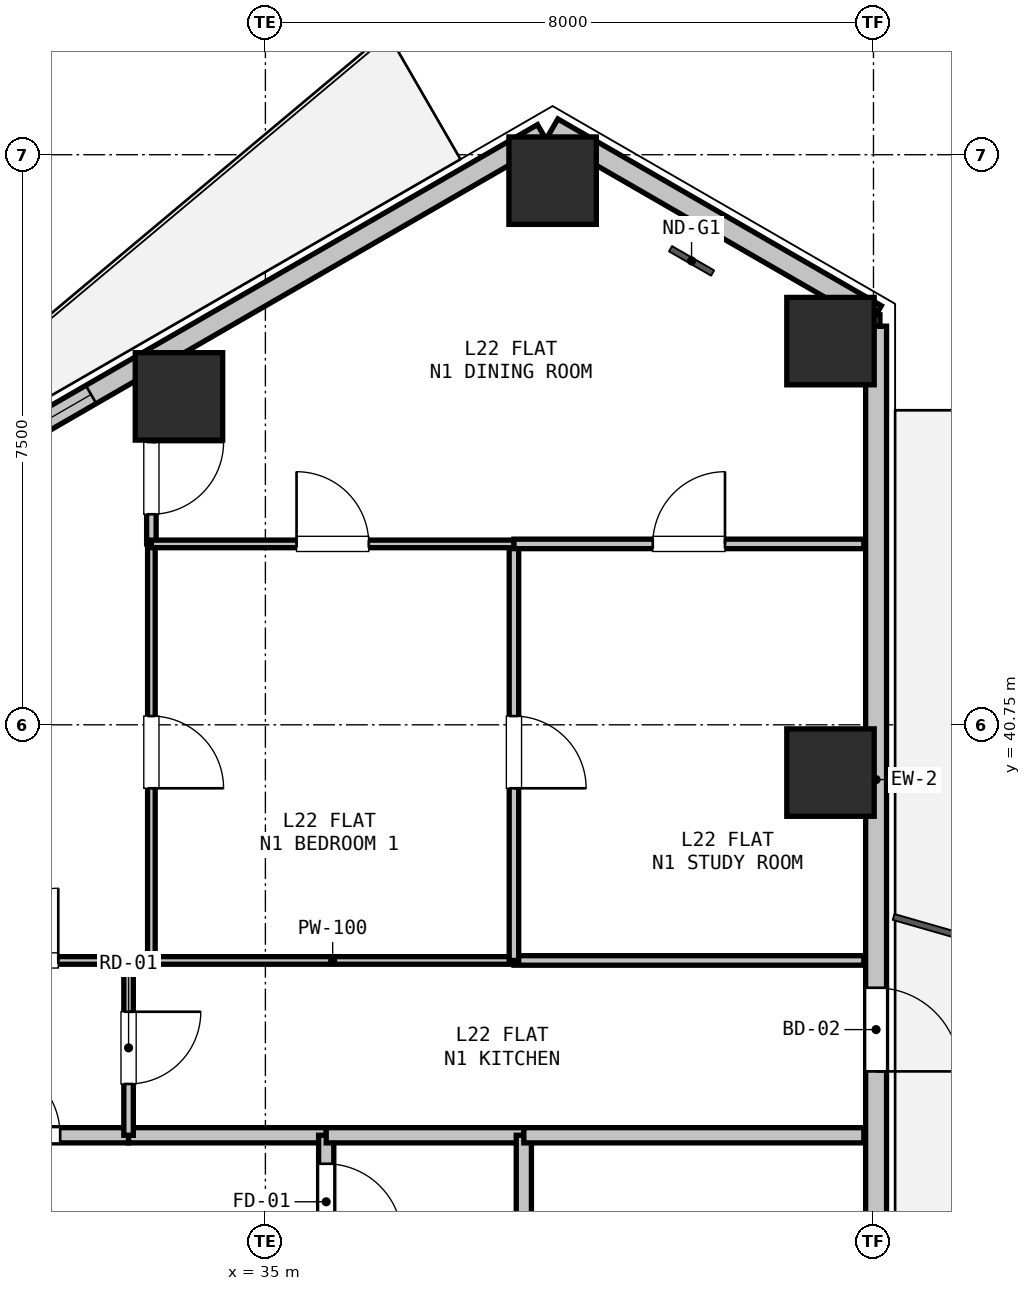
"""IFC4 building model, lengths in metres.
Left out: names, types, materials, properties, quantities, classifications, styles, units other than length and angle.
Written with IfcOpenShell. Run it as: python <this file> out.ifc"""

import sys

from ifc_helpers import new_model, si_unit, direction, frame, frame_2d, origin, origin_2d, place, context, subcontext, project, spatial, rectangle, hollow_rectangle, extrude, element, fill, save


model = new_model("IFC4")
c1 = context("Model", 3, precision=1e-05, world=origin(), true_north=direction((0.0, 1.0)))
c2 = subcontext(c1, "Body", "Model", "MODEL_VIEW")
j1 = project(units=[si_unit("LENGTHUNIT", "METRE"), si_unit("PLANEANGLEUNIT", "RADIAN")], contexts=[c1])
p1 = place(None, origin())
s1 = spatial("IfcSite", under=j1, at=p1, CompositionType="ELEMENT")
p2 = place(p1, origin())
s2 = spatial("IfcBuilding", under=s1, at=p2, CompositionType="ELEMENT")
p3 = place(p2, frame((0.0, 0.0, 83.4)))
s3 = spatial("IfcBuildingStorey", under=s2, at=p3, CompositionType="ELEMENT", Elevation=83.4)
for number, where, z_axis, x_axis in (
    (1, (33.863, 45.071, 0.0), (0.0, 0.0, 1.0), (1.0, 0.0, 0.0)),
    (2, (38.779, 47.909, 0.0), (0.0, 0.0, 1.0), (1.0, 0.0, 0.0)),
    (3, (42.435, 45.798, 0.0), (0.0, 0.0, 1.0), (1.0, 0.0, 0.0)),
    (4, (42.435, 40.122, 0.0), (0.0, 0.0, 1.0), (1.0, 0.0, 0.0)),
):
    element("IfcColumn", number, at=place(p3, frame(where, z_axis=z_axis, x_axis=x_axis)), inside=s3, PredefinedType="COLUMN", context=c2, shape_type="SweptSolid", body=[
        extrude(hollow_rectangle(XDim=1.15, YDim=1.15, WallThickness=0.032, at=origin_2d()), origin(), (0.0, 0.0, 1.0), 3.3),
    ])
p4 = place(p3, frame((38.779, 48.602, 0.0), z_axis=(0.0, 0.0, 1.0), x_axis=(0.866011848704, -0.500023477353, 0.0)))
e5 = element("IfcWall", 5, at=p4, inside=s3, PredefinedType="SOLIDWALL", context=c2, shape_type="SweptSolid", body=[
    extrude(rectangle(XDim=4.914, YDim=0.275, at=frame_2d((2.457, 0.0))), origin(), (0.0, 0.0, 1.0), 2.67),
])
p5 = place(p3, frame((28.317, 42.562, 0.0), z_axis=(0.0, 0.0, 1.0), x_axis=(0.866023023012, 0.500004123596, 0.0)))
e6 = element("IfcWall", 6, at=p5, inside=s3, PredefinedType="SOLIDWALL", context=c2, shape_type="SweptSolid", body=[
    extrude(rectangle(XDim=11.93, YDim=0.275, at=frame_2d((5.965, 0.0))), origin(), (0.0, 0.0, 1.0), 2.67),
])
p6 = place(p5, frame((2.668, 0.0, 0.9)))
e7 = element("IfcOpeningElement", 7, at=p6, cuts=e6, PredefinedType="OPENING", context=c2, shape_type="SweptSolid", body=[
    extrude(rectangle(XDim=2.4, YDim=1.6, at=frame_2d((1.2, 0.8))), frame((0.0, 0.147, 0.0), z_axis=(0.0, -1.0, 0.0), x_axis=(1.0, 0.0, 0.0)), (0.0, 0.0, 1.0), 0.295),
])
p7 = place(p3, frame((43.035, 45.994, 0.0), z_axis=(0.0, 0.0, 1.0), x_axis=(0.0, -1.0, 0.0)))
e8 = element("IfcWall", 8, at=p7, inside=s3, PredefinedType="SOLIDWALL", context=c2, shape_type="SweptSolid", body=[
    extrude(rectangle(XDim=11.93, YDim=0.275, at=frame_2d((5.965, 0.0))), origin(), (0.0, 0.0, 1.0), 2.67),
])
p8 = place(p7, frame((8.704, 0.0, 0.0)))
e9 = element("IfcOpeningElement", 9, at=p8, cuts=e8, PredefinedType="OPENING", context=c2, shape_type="SweptSolid", body=[
    extrude(rectangle(XDim=1.1, YDim=2.1, at=frame_2d((0.55, 1.05))), frame((0.0, 0.147, 0.0), z_axis=(0.0, -1.0, 0.0), x_axis=(1.0, 0.0, 0.0)), (0.0, 0.0, 1.0), 0.295),
])
p9 = place(p3, frame((30.4, 35.35, 0.0), z_axis=(0.0, 0.0, 1.0), x_axis=(1.0, 0.0, 0.0)))
e10 = element("IfcWall", 10, at=p9, inside=s3, PredefinedType="PARTITIONING", context=c2, shape_type="SweptSolid", body=[
    extrude(rectangle(XDim=2.8, YDim=0.2, at=frame_2d((1.4, 0.0))), origin(), (0.0, 0.0, 1.0), 3.05),
])
p10 = place(p9, frame((0.9, 0.0, 0.0)))
e11 = element("IfcOpeningElement", 11, at=p10, cuts=e10, PredefinedType="OPENING", context=c2, shape_type="SweptSolid", body=[
    extrude(rectangle(XDim=1.0, YDim=2.15, at=frame_2d((0.5, 1.075))), frame((0.0, 0.11, 0.0), z_axis=(0.0, -1.0, 0.0), x_axis=(1.0, 0.0, 0.0)), (0.0, 0.0, 1.0), 0.22),
])
p11 = place(p3, frame((33.2, 35.35, 0.0), z_axis=(0.0, 0.0, 1.0), x_axis=(1.0, 0.0, 0.0)))
e12 = element("IfcWall", 12, at=p11, inside=s3, PredefinedType="PARTITIONING", context=c2, shape_type="SweptSolid", body=[
    extrude(rectangle(XDim=2.6, YDim=0.2, at=frame_2d((1.3, 0.0))), origin(), (0.0, 0.0, 1.0), 3.05),
])
p12 = place(p3, frame((35.8, 35.35, 0.0), z_axis=(0.0, 0.0, 1.0), x_axis=(0.0, -1.0, 0.0)))
e13 = element("IfcWall", 13, at=p12, inside=s3, PredefinedType="PARTITIONING", context=c2, shape_type="SweptSolid", body=[
    extrude(rectangle(XDim=1.75, YDim=0.2, at=frame_2d((0.875, 0.0))), origin(), (0.0, 0.0, 1.0), 3.05),
])
p13 = place(p12, frame((0.375, 0.0, 0.0)))
e14 = element("IfcOpeningElement", 14, at=p13, cuts=e13, PredefinedType="OPENING", context=c2, shape_type="SweptSolid", body=[
    extrude(rectangle(XDim=1.0, YDim=2.15, at=frame_2d((0.5, 1.075))), frame((0.0, 0.11, 0.0), z_axis=(0.0, -1.0, 0.0), x_axis=(1.0, 0.0, 0.0)), (0.0, 0.0, 1.0), 0.22),
])
p14 = place(p3, frame((35.8, 35.35, 0.0), z_axis=(0.0, 0.0, 1.0), x_axis=(1.0, 0.0, 0.0)))
e15 = element("IfcWall", 15, at=p14, inside=s3, PredefinedType="PARTITIONING", context=c2, shape_type="SweptSolid", body=[
    extrude(rectangle(XDim=2.6, YDim=0.2, at=frame_2d((1.3, 0.0))), origin(), (0.0, 0.0, 1.0), 2.423),
])
p15 = place(p3, frame((38.4, 35.35, 0.0), z_axis=(0.0, 0.0, 1.0), x_axis=(0.0, -1.0, 0.0)))
e16 = element("IfcWall", 16, at=p15, inside=s3, PredefinedType="PARTITIONING", context=c2, shape_type="SweptSolid", body=[
    extrude(rectangle(XDim=6.85, YDim=0.2, at=frame_2d((3.425, 0.0))), origin(), (0.0, 0.0, 1.0), 3.05),
])
p16 = place(p15, frame((2.925, 0.0, 0.0)))
e17 = element("IfcOpeningElement", 17, at=p16, cuts=e16, PredefinedType="OPENING", context=c2, shape_type="SweptSolid", body=[
    extrude(rectangle(XDim=1.0, YDim=2.15, at=frame_2d((0.5, 1.075))), frame((0.0, 0.11, 0.0), z_axis=(0.0, -1.0, 0.0), x_axis=(1.0, 0.0, 0.0)), (0.0, 0.0, 1.0), 0.22),
])
p17 = place(p3, frame((30.4, 37.65, 0.0), z_axis=(0.0, 0.0, 1.0), x_axis=(1.0, 0.0, 0.0)))
e18 = element("IfcWall", 18, at=p17, inside=s3, PredefinedType="PARTITIONING", context=c2, shape_type="SweptSolid", body=[
    extrude(rectangle(XDim=2.8, YDim=0.1, at=frame_2d((1.4, 0.0))), origin(), (0.0, 0.0, 1.0), 3.05),
])
p18 = place(p17, frame((0.925, 0.0, 0.0)))
e19 = element("IfcOpeningElement", 19, at=p18, cuts=e18, PredefinedType="OPENING", context=c2, shape_type="SweptSolid", body=[
    extrude(rectangle(XDim=0.95, YDim=2.1, at=frame_2d((0.475, 1.05))), frame((0.0, 0.06, 0.0), z_axis=(0.0, -1.0, 0.0), x_axis=(1.0, 0.0, 0.0)), (0.0, 0.0, 1.0), 0.12),
])
p19 = place(p3, frame((33.2, 37.65, 0.0), z_axis=(0.0, 0.0, 1.0), x_axis=(0.0, -1.0, 0.0)))
e20 = element("IfcWall", 20, at=p19, inside=s3, PredefinedType="PARTITIONING", context=c2, shape_type="SweptSolid", body=[
    extrude(rectangle(XDim=2.3, YDim=0.125, at=frame_2d((1.15, 0.0))), origin(), (0.0, 0.0, 1.0), 3.05),
])
p20 = place(p19, frame((0.675, 0.0, 0.0)))
e21 = element("IfcOpeningElement", 21, at=p20, cuts=e20, PredefinedType="OPENING", context=c2, shape_type="SweptSolid", body=[
    extrude(rectangle(XDim=0.95, YDim=2.1, at=frame_2d((0.475, 1.05))), frame((0.0, 0.073, 0.0), z_axis=(0.0, -1.0, 0.0), x_axis=(1.0, 0.0, 0.0)), (0.0, 0.0, 1.0), 0.145),
])
p21 = place(p3, frame((42.873, 35.35, 0.0), z_axis=(0.0, 0.0, 1.0), x_axis=(-1.0, 0.0, 0.0)))
e22 = element("IfcWall", 22, at=p21, inside=s3, PredefinedType="PARTITIONING", context=c2, shape_type="SweptSolid", body=[
    extrude(rectangle(XDim=4.473, YDim=0.2, at=frame_2d((2.237, 0.0))), origin(), (0.0, 0.0, 1.0), 2.365),
])
p22 = place(p3, frame((33.2, 37.65, 0.0), z_axis=(0.0, 0.0, 1.0), x_axis=(1.0, 0.0, 0.0)))
e23 = element("IfcWall", 23, at=p22, inside=s3, PredefinedType="PARTITIONING", context=c2, shape_type="SweptSolid", body=[
    extrude(rectangle(XDim=0.3, YDim=0.125, at=frame_2d((0.15, 0.0))), origin(), (0.0, 0.0, 1.0), 3.05),
])
p23 = place(p3, frame((33.5, 37.65, 0.0), z_axis=(0.0, 0.0, 1.0), x_axis=(1.0, 0.0, 0.0)))
e24 = element("IfcWall", 24, at=p23, inside=s3, PredefinedType="PARTITIONING", context=c2, shape_type="SweptSolid", body=[
    extrude(rectangle(XDim=4.77, YDim=0.1, at=frame_2d((2.385, 0.0))), origin(), (0.0, 0.0, 1.0), 2.423),
])
p24 = place(p3, frame((38.27, 37.65, 0.0), z_axis=(0.0, 0.0, 1.0), x_axis=(1.0, 0.0, 0.0)))
e25 = element("IfcWall", 25, at=p24, inside=s3, PredefinedType="PARTITIONING", context=c2, shape_type="SweptSolid", body=[
    extrude(rectangle(XDim=4.603, YDim=0.125, at=frame_2d((2.302, 0.0))), origin(), (0.0, 0.0, 1.0), 2.365),
])
p25 = place(p3, frame((33.5, 45.367, 0.0), z_axis=(0.0, 0.0, 1.0), x_axis=(0.0, -1.0, 0.0)))
e26 = element("IfcWall", 26, at=p25, inside=s3, PredefinedType="PARTITIONING", context=c2, shape_type="SweptSolid", body=[
    extrude(rectangle(XDim=2.237, YDim=0.125, at=frame_2d((1.119, 0.0))), origin(), (0.0, 0.0, 1.0), 2.66),
])
p26 = place(p25, frame((0.897, 0.0, 0.0)))
e27 = element("IfcOpeningElement", 27, at=p26, cuts=e26, PredefinedType="OPENING", context=c2, shape_type="SweptSolid", body=[
    extrude(rectangle(XDim=0.95, YDim=2.1, at=frame_2d((0.475, 1.05))), frame((0.0, 0.073, 0.0), z_axis=(0.0, -1.0, 0.0), x_axis=(1.0, 0.0, 0.0)), (0.0, 0.0, 1.0), 0.145),
])
p27 = place(p3, frame((33.5, 43.13, 0.0), z_axis=(0.0, 0.0, 1.0), x_axis=(0.0, -1.0, 0.0)))
e28 = element("IfcWall", 28, at=p27, inside=s3, PredefinedType="PARTITIONING", context=c2, shape_type="SweptSolid", body=[
    extrude(rectangle(XDim=5.48, YDim=0.1, at=frame_2d((2.74, 0.0))), origin(), (0.0, 0.0, 1.0), 3.05),
])
p28 = place(p27, frame((2.265, 0.0, 0.0)))
e29 = element("IfcOpeningElement", 29, at=p28, cuts=e28, PredefinedType="OPENING", context=c2, shape_type="SweptSolid", body=[
    extrude(rectangle(XDim=0.95, YDim=2.1, at=frame_2d((0.475, 1.05))), frame((0.0, 0.06, 0.0), z_axis=(0.0, -1.0, 0.0), x_axis=(1.0, 0.0, 0.0)), (0.0, 0.0, 1.0), 0.12),
])
p29 = place(p3, frame((38.27, 43.13, 0.0), z_axis=(0.0, 0.0, 1.0), x_axis=(0.0, -1.0, 0.0)))
e30 = element("IfcWall", 30, at=p29, inside=s3, PredefinedType="PARTITIONING", context=c2, shape_type="SweptSolid", body=[
    extrude(rectangle(XDim=5.48, YDim=0.125, at=frame_2d((2.74, 0.0))), origin(), (0.0, 0.0, 1.0), 3.05),
])
p30 = place(p29, frame((2.265, 0.0, 0.0)))
e31 = element("IfcOpeningElement", 31, at=p30, cuts=e30, PredefinedType="OPENING", context=c2, shape_type="SweptSolid", body=[
    extrude(rectangle(XDim=0.95, YDim=2.1, at=frame_2d((0.475, 1.05))), frame((0.0, 0.073, 0.0), z_axis=(0.0, -1.0, 0.0), x_axis=(1.0, 0.0, 0.0)), (0.0, 0.0, 1.0), 0.145),
])
p31 = place(p3, frame((33.5, 43.13, 0.0), z_axis=(0.0, 0.0, 1.0), x_axis=(1.0, 0.0, 0.0)))
e32 = element("IfcWall", 32, at=p31, inside=s3, PredefinedType="PARTITIONING", context=c2, shape_type="SweptSolid", body=[
    extrude(rectangle(XDim=4.77, YDim=0.1, at=frame_2d((2.385, 0.0))), origin(), (0.0, 0.0, 1.0), 2.423),
])
p32 = place(p31, frame((1.91, 0.0, 0.0)))
e33 = element("IfcOpeningElement", 33, at=p32, cuts=e32, PredefinedType="OPENING", context=c2, shape_type="SweptSolid", body=[
    extrude(rectangle(XDim=0.95, YDim=2.1, at=frame_2d((0.475, 1.05))), frame((0.0, 0.06, 0.0), z_axis=(0.0, -1.0, 0.0), x_axis=(1.0, 0.0, 0.0)), (0.0, 0.0, 1.0), 0.12),
])
p33 = place(p3, frame((38.27, 43.13, 0.0), z_axis=(0.0, 0.0, 1.0), x_axis=(1.0, 0.0, 0.0)))
e34 = element("IfcWall", 34, at=p33, inside=s3, PredefinedType="PARTITIONING", context=c2, shape_type="SweptSolid", body=[
    extrude(rectangle(XDim=4.603, YDim=0.125, at=frame_2d((2.302, 0.0))), origin(), (0.0, 0.0, 1.0), 2.66),
])
p34 = place(p33, frame((1.826, 0.0, 0.0)))
e35 = element("IfcOpeningElement", 35, at=p34, cuts=e34, PredefinedType="OPENING", context=c2, shape_type="SweptSolid", body=[
    extrude(rectangle(XDim=0.95, YDim=2.1, at=frame_2d((0.475, 1.05))), frame((0.0, 0.073, 0.0), z_axis=(0.0, -1.0, 0.0), x_axis=(1.0, 0.0, 0.0)), (0.0, 0.0, 1.0), 0.145),
])
p35 = place(p3, frame((43.035, 46.144, 0.0), z_axis=(0.0, 0.0, 1.0), x_axis=(0.0, -1.0, 0.0)))
e36 = element("IfcWall", 36, at=p35, inside=s3, PredefinedType="PARTITIONING", context=c2, shape_type="SweptSolid", body=[
    extrude(rectangle(XDim=0.15, YDim=0.1, at=frame_2d((0.075, 0.0))), origin(), (0.0, 0.0, 1.0), 3.05),
])
p36 = place(p6, origin())
e37 = element("IfcWindow", 37, at=p36, inside=s3, PartitioningType="SINGLE_PANEL", PredefinedType="WINDOW", context=c2, shape_type="SweptSolid", body=[
    extrude(rectangle(XDim=2.4, YDim=1.6, at=frame_2d((1.2, 0.8))), frame((0.0, 0.03, 0.0), z_axis=(0.0, -1.0, 0.0), x_axis=(1.0, 0.0, 0.0)), (0.0, 0.0, 1.0), 0.06),
])
fill(e7, e37)
p37 = place(p8, origin())
e38 = element("IfcDoor", 38, at=p37, inside=s3, OperationType="SINGLE_SWING_RIGHT", PredefinedType="DOOR", context=c2, shape_type="SweptSolid", body=[
    extrude(rectangle(XDim=1.1, YDim=2.1, at=frame_2d((0.55, 1.05))), frame((0.0, 0.025, 0.0), z_axis=(0.0, -1.0, 0.0), x_axis=(1.0, 0.0, 0.0)), (0.0, 0.0, 1.0), 0.05),
])
fill(e9, e38)
p38 = place(p13, origin())
e39 = element("IfcDoor", 39, at=p38, inside=s3, OperationType="SINGLE_SWING_RIGHT", PredefinedType="DOOR", context=c2, shape_type="SweptSolid", body=[
    extrude(rectangle(XDim=1.0, YDim=2.15, at=frame_2d((0.5, 1.075))), frame((0.0, 0.025, 0.0), z_axis=(0.0, -1.0, 0.0), x_axis=(1.0, 0.0, 0.0)), (0.0, 0.0, 1.0), 0.05),
])
fill(e14, e39)
p39 = place(p10, origin())
e40 = element("IfcDoor", 40, at=p39, inside=s3, OperationType="SINGLE_SWING_LEFT", PredefinedType="DOOR", context=c2, shape_type="SweptSolid", body=[
    extrude(rectangle(XDim=1.0, YDim=2.15, at=frame_2d((0.5, 1.075))), frame((0.0, 0.025, 0.0), z_axis=(0.0, -1.0, 0.0), x_axis=(1.0, 0.0, 0.0)), (0.0, 0.0, 1.0), 0.05),
])
fill(e11, e40)
p40 = place(p20, origin())
e41 = element("IfcDoor", 41, at=p40, inside=s3, OperationType="SINGLE_SWING_LEFT", PredefinedType="DOOR", context=c2, shape_type="SweptSolid", body=[
    extrude(rectangle(XDim=0.95, YDim=2.1, at=frame_2d((0.475, 1.05))), frame((0.0, 0.025, 0.0), z_axis=(0.0, -1.0, 0.0), x_axis=(1.0, 0.0, 0.0)), (0.0, 0.0, 1.0), 0.05),
])
fill(e21, e41)
p41 = place(p18, origin())
e42 = element("IfcDoor", 42, at=p41, inside=s3, OperationType="SINGLE_SWING_RIGHT", PredefinedType="DOOR", context=c2, shape_type="SweptSolid", body=[
    extrude(rectangle(XDim=0.95, YDim=2.1, at=frame_2d((0.475, 1.05))), frame((0.0, 0.025, 0.0), z_axis=(0.0, -1.0, 0.0), x_axis=(1.0, 0.0, 0.0)), (0.0, 0.0, 1.0), 0.05),
])
fill(e19, e42)
p42 = place(p28, origin())
e43 = element("IfcDoor", 43, at=p42, inside=s3, OperationType="SINGLE_SWING_RIGHT", PredefinedType="DOOR", context=c2, shape_type="SweptSolid", body=[
    extrude(rectangle(XDim=0.95, YDim=2.1, at=frame_2d((0.475, 1.05))), frame((0.0, 0.025, 0.0), z_axis=(0.0, -1.0, 0.0), x_axis=(1.0, 0.0, 0.0)), (0.0, 0.0, 1.0), 0.05),
])
fill(e29, e43)
p43 = place(p26, origin())
e44 = element("IfcDoor", 44, at=p43, inside=s3, OperationType="SINGLE_SWING_LEFT", PredefinedType="DOOR", context=c2, shape_type="SweptSolid", body=[
    extrude(rectangle(XDim=0.95, YDim=2.1, at=frame_2d((0.475, 1.05))), frame((0.0, 0.025, 0.0), z_axis=(0.0, -1.0, 0.0), x_axis=(1.0, 0.0, 0.0)), (0.0, 0.0, 1.0), 0.05),
])
fill(e27, e44)
p44 = place(p30, origin())
e45 = element("IfcDoor", 45, at=p44, inside=s3, OperationType="SINGLE_SWING_RIGHT", PredefinedType="DOOR", context=c2, shape_type="SweptSolid", body=[
    extrude(rectangle(XDim=0.95, YDim=2.1, at=frame_2d((0.475, 1.05))), frame((0.0, 0.025, 0.0), z_axis=(0.0, -1.0, 0.0), x_axis=(1.0, 0.0, 0.0)), (0.0, 0.0, 1.0), 0.05),
])
fill(e31, e45)
p45 = place(p32, origin())
e46 = element("IfcDoor", 46, at=p45, inside=s3, OperationType="SINGLE_SWING_LEFT", PredefinedType="DOOR", context=c2, shape_type="SweptSolid", body=[
    extrude(rectangle(XDim=0.95, YDim=2.1, at=frame_2d((0.475, 1.05))), frame((0.0, 0.025, 0.0), z_axis=(0.0, -1.0, 0.0), x_axis=(1.0, 0.0, 0.0)), (0.0, 0.0, 1.0), 0.05),
])
fill(e33, e46)
p46 = place(p34, origin())
e47 = element("IfcDoor", 47, at=p46, inside=s3, OperationType="SINGLE_SWING_RIGHT", PredefinedType="DOOR", context=c2, shape_type="SweptSolid", body=[
    extrude(rectangle(XDim=0.95, YDim=2.1, at=frame_2d((0.475, 1.05))), frame((0.0, 0.025, 0.0), z_axis=(0.0, -1.0, 0.0), x_axis=(1.0, 0.0, 0.0)), (0.0, 0.0, 1.0), 0.05),
])
fill(e35, e47)
save(model, sys.argv[1])
